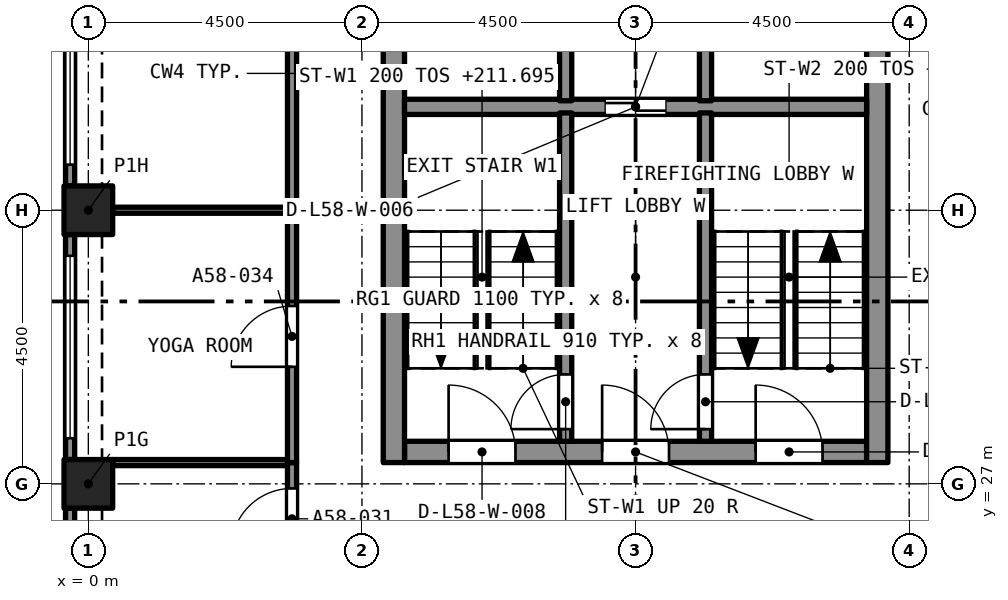
"""IFC4 building model, lengths in metres.
Left out: names, types, materials, properties, quantities, classifications, styles, units other than length and angle.
Written with IfcOpenShell. Run it as: python <this file> out.ifc"""

import sys

from ifc_helpers import new_model, si_unit, direction, frame, frame_2d, origin, origin_2d, place, context, subcontext, project, spatial, rectangle, extrude, element, fill, save


model = new_model("IFC4")
c1 = context("Model", 3, precision=1e-05, world=origin(), true_north=direction((0.0, 1.0)))
c2 = subcontext(c1, "Body", "Model", "MODEL_VIEW")
j1 = project(units=[si_unit("LENGTHUNIT", "METRE"), si_unit("PLANEANGLEUNIT", "RADIAN")], contexts=[c1])
p1 = place(None, origin())
s1 = spatial("IfcSite", under=j1, at=p1, CompositionType="ELEMENT")
p2 = place(p1, origin())
s2 = spatial("IfcBuilding", under=s1, at=p2, CompositionType="ELEMENT")
p3 = place(p2, frame((0.0, 0.0, 210.095)))
s3 = spatial("IfcBuildingStorey", under=s2, at=p3, CompositionType="ELEMENT", Elevation=210.095)
for number, where, z_axis, x_axis in (
    (1, (0.0, 27.0, 0.0), (0.0, 0.0, 1.0), (1.0, 0.0, 0.0)),
    (2, (0.0, 31.5, 0.0), (0.0, 0.0, 1.0), (1.0, 0.0, 0.0)),
):
    element("IfcColumn", number, at=place(p3, frame(where, z_axis=z_axis, x_axis=x_axis)), inside=s3, PredefinedType="COLUMN", context=c2, shape_type="SweptSolid", body=[
        extrude(rectangle(XDim=0.8, YDim=0.8, at=origin_2d()), origin(), (0.0, 0.0, 1.0), 3.2),
    ])
p4 = place(p3, frame((5.2, 27.525, 0.0), z_axis=(0.0, 0.0, 1.0), x_axis=(1.0, 0.0, 0.0)))
e3 = element("IfcWall", 3, at=p4, inside=s3, PredefinedType="SOLIDWALL", context=c2, shape_type="SweptSolid", body=[
    extrude(rectangle(XDim=7.6, YDim=0.35, at=frame_2d((3.8, 0.0))), origin(), (0.0, 0.0, 1.0), 3.2),
])
p5 = place(p4, frame((0.725, 0.0, 0.0)))
e4 = element("IfcOpeningElement", 4, at=p5, cuts=e3, PredefinedType="OPENING", context=c2, shape_type="SweptSolid", body=[
    extrude(rectangle(XDim=1.1, YDim=2.1, at=frame_2d((0.55, 1.05))), frame((0.0, 0.185, 0.0), z_axis=(0.0, -1.0, 0.0), x_axis=(1.0, 0.0, 0.0)), (0.0, 0.0, 1.0), 0.37),
])
p6 = place(p4, frame((3.25, 0.0, 0.0)))
e5 = element("IfcOpeningElement", 5, at=p6, cuts=e3, PredefinedType="OPENING", context=c2, shape_type="SweptSolid", body=[
    extrude(rectangle(XDim=1.1, YDim=2.1, at=frame_2d((0.55, 1.05))), frame((0.0, 0.185, 0.0), z_axis=(0.0, -1.0, 0.0), x_axis=(1.0, 0.0, 0.0)), (0.0, 0.0, 1.0), 0.37),
])
p7 = place(p4, frame((5.775, 0.0, 0.0)))
e6 = element("IfcOpeningElement", 6, at=p7, cuts=e3, PredefinedType="OPENING", context=c2, shape_type="SweptSolid", body=[
    extrude(rectangle(XDim=1.1, YDim=2.1, at=frame_2d((0.55, 1.05))), frame((0.0, 0.185, 0.0), z_axis=(0.0, -1.0, 0.0), x_axis=(1.0, 0.0, 0.0)), (0.0, 0.0, 1.0), 0.37),
])
p8 = place(p3, frame((5.025, 27.35, 0.0), z_axis=(0.0, 0.0, 1.0), x_axis=(0.0, 1.0, 0.0)))
e7 = element("IfcWall", 7, at=p8, inside=s3, PredefinedType="SOLIDWALL", context=c2, shape_type="SweptSolid", body=[
    extrude(rectangle(XDim=12.8, YDim=0.35, at=frame_2d((6.4, 0.0))), origin(), (0.0, 0.0, 1.0), 3.2),
])
p9 = place(p8, frame((8.6, 0.0, 0.0)))
e8 = element("IfcOpeningElement", 8, at=p9, cuts=e7, PredefinedType="OPENING", context=c2, shape_type="SweptSolid", body=[
    extrude(rectangle(XDim=1.2, YDim=2.1, at=frame_2d((0.6, 1.05))), frame((0.0, 0.185, 0.0), z_axis=(0.0, -1.0, 0.0), x_axis=(1.0, 0.0, 0.0)), (0.0, 0.0, 1.0), 0.37),
])
p10 = place(p3, frame((12.975, 27.35, 0.0), z_axis=(0.0, 0.0, 1.0), x_axis=(0.0, 1.0, 0.0)))
e9 = element("IfcWall", 9, at=p10, inside=s3, PredefinedType="SOLIDWALL", context=c2, shape_type="SweptSolid", body=[
    extrude(rectangle(XDim=12.8, YDim=0.35, at=frame_2d((6.4, 0.0))), origin(), (0.0, 0.0, 1.0), 3.2),
])
p11 = place(p10, frame((10.75, 0.0, 0.0)))
e10 = element("IfcOpeningElement", 10, at=p11, cuts=e9, PredefinedType="OPENING", context=c2, shape_type="SweptSolid", body=[
    extrude(rectangle(XDim=1.1, YDim=2.1, at=frame_2d((0.55, 1.05))), frame((0.0, 0.185, 0.0), z_axis=(0.0, -1.0, 0.0), x_axis=(1.0, 0.0, 0.0)), (0.0, 0.0, 1.0), 0.37),
])
p12 = place(p10, frame((8.6, 0.0, 0.0)))
e11 = element("IfcOpeningElement", 11, at=p12, cuts=e9, PredefinedType="OPENING", context=c2, shape_type="SweptSolid", body=[
    extrude(rectangle(XDim=1.2, YDim=2.1, at=frame_2d((0.6, 1.05))), frame((0.0, 0.185, 0.0), z_axis=(0.0, -1.0, 0.0), x_axis=(1.0, 0.0, 0.0)), (0.0, 0.0, 1.0), 0.37),
])
p13 = place(p3, frame((-0.3, 31.9, 0.0), z_axis=(0.0, 0.0, 1.0), x_axis=(0.0, 1.0, 0.0)))
e12 = element("IfcWall", 12, at=p13, inside=s3, PredefinedType="SOLIDWALL", context=c2, shape_type="SweptSolid", body=[
    extrude(rectangle(XDim=3.7, YDim=0.15, at=frame_2d((1.85, 0.0))), origin(), (0.0, 0.0, 1.0), 3.2),
])
p14 = place(p13, frame((0.35, 0.0, 0.45)))
e13 = element("IfcOpeningElement", 13, at=p14, cuts=e12, PredefinedType="OPENING", context=c2, shape_type="SweptSolid", body=[
    extrude(rectangle(XDim=3.0, YDim=1.95, at=frame_2d((1.5, 0.975))), frame((0.0, 0.085, 0.0), z_axis=(0.0, -1.0, 0.0), x_axis=(1.0, 0.0, 0.0)), (0.0, 0.0, 1.0), 0.17),
])
p15 = place(p3, frame((-0.3, 27.4, 0.0), z_axis=(0.0, 0.0, 1.0), x_axis=(0.0, 1.0, 0.0)))
e14 = element("IfcWall", 14, at=p15, inside=s3, PredefinedType="SOLIDWALL", context=c2, shape_type="SweptSolid", body=[
    extrude(rectangle(XDim=3.7, YDim=0.15, at=frame_2d((1.85, 0.0))), origin(), (0.0, 0.0, 1.0), 3.2),
])
p16 = place(p15, frame((0.35, 0.0, 0.45)))
e15 = element("IfcOpeningElement", 15, at=p16, cuts=e14, PredefinedType="OPENING", context=c2, shape_type="SweptSolid", body=[
    extrude(rectangle(XDim=3.0, YDim=1.95, at=frame_2d((1.5, 0.975))), frame((0.0, 0.085, 0.0), z_axis=(0.0, -1.0, 0.0), x_axis=(1.0, 0.0, 0.0)), (0.0, 0.0, 1.0), 0.17),
])
p17 = place(p3, frame((-0.3, 22.9, 0.0), z_axis=(0.0, 0.0, 1.0), x_axis=(0.0, 1.0, 0.0)))
e16 = element("IfcWall", 16, at=p17, inside=s3, PredefinedType="SOLIDWALL", context=c2, shape_type="SweptSolid", body=[
    extrude(rectangle(XDim=3.7, YDim=0.15, at=frame_2d((1.85, 0.0))), origin(), (0.0, 0.0, 1.0), 3.2),
])
p18 = place(p17, frame((0.35, 0.0, 0.45)))
e17 = element("IfcOpeningElement", 17, at=p18, cuts=e16, PredefinedType="OPENING", context=c2, shape_type="SweptSolid", body=[
    extrude(rectangle(XDim=3.0, YDim=1.95, at=frame_2d((1.5, 0.975))), frame((0.0, 0.085, 0.0), z_axis=(0.0, -1.0, 0.0), x_axis=(1.0, 0.0, 0.0)), (0.0, 0.0, 1.0), 0.17),
])
p19 = place(p3, frame((3.35, 25.425, 0.0), z_axis=(0.0, 0.0, 1.0), x_axis=(0.0, 1.0, 0.0)))
e18 = element("IfcWall", 18, at=p19, inside=s3, PredefinedType="PARTITIONING", context=c2, shape_type="SweptSolid", body=[
    extrude(rectangle(XDim=1.925, YDim=0.15, at=frame_2d((0.962, 0.0))), origin(), (0.0, 0.0, 1.0), 2.9),
])
p20 = place(p19, frame((0.5, 0.0, 0.0)))
e19 = element("IfcOpeningElement", 19, at=p20, cuts=e18, PredefinedType="OPENING", context=c2, shape_type="SweptSolid", body=[
    extrude(rectangle(XDim=1.0, YDim=2.1, at=frame_2d((0.5, 1.05))), frame((0.0, 0.085, 0.0), z_axis=(0.0, -1.0, 0.0), x_axis=(1.0, 0.0, 0.0)), (0.0, 0.0, 1.0), 0.17),
])
p21 = place(p3, frame((3.35, 27.35, 0.0), z_axis=(0.0, 0.0, 1.0), x_axis=(0.0, 1.0, 0.0)))
e20 = element("IfcWall", 20, at=p21, inside=s3, PredefinedType="PARTITIONING", context=c2, shape_type="SweptSolid", body=[
    extrude(rectangle(XDim=4.15, YDim=0.15, at=frame_2d((2.075, 0.0))), origin(), (0.0, 0.0, 1.0), 2.9),
])
p22 = place(p21, frame((1.575, 0.0, 0.0)))
e21 = element("IfcOpeningElement", 21, at=p22, cuts=e20, PredefinedType="OPENING", context=c2, shape_type="SweptSolid", body=[
    extrude(rectangle(XDim=1.0, YDim=2.1, at=frame_2d((0.5, 1.05))), frame((0.0, 0.085, 0.0), z_axis=(0.0, -1.0, 0.0), x_axis=(1.0, 0.0, 0.0)), (0.0, 0.0, 1.0), 0.17),
])
p23 = place(p3, frame((3.35, 31.5, 0.0), z_axis=(0.0, 0.0, 1.0), x_axis=(0.0, 1.0, 0.0)))
e22 = element("IfcWall", 22, at=p23, inside=s3, PredefinedType="PARTITIONING", context=c2, shape_type="SweptSolid", body=[
    extrude(rectangle(XDim=8.525, YDim=0.15, at=frame_2d((4.262, 0.0))), origin(), (0.0, 0.0, 1.0), 2.9),
])
p24 = place(p23, frame((3.825, 0.0, 0.0)))
e23 = element("IfcOpeningElement", 23, at=p24, cuts=e22, PredefinedType="OPENING", context=c2, shape_type="SweptSolid", body=[
    extrude(rectangle(XDim=1.0, YDim=2.1, at=frame_2d((0.5, 1.05))), frame((0.0, 0.085, 0.0), z_axis=(0.0, -1.0, 0.0), x_axis=(1.0, 0.0, 0.0)), (0.0, 0.0, 1.0), 0.17),
])
for number, where, z_axis, x_axis in (
    (24, (0.4, 27.35, 0.0), (0.0, 0.0, 1.0), (1.0, 0.0, 0.0)),
    (25, (0.4, 31.5, 0.0), (0.0, 0.0, 1.0), (1.0, 0.0, 0.0)),
):
    element("IfcWall", number, at=place(p3, frame(where, z_axis=z_axis, x_axis=x_axis)), inside=s3, PredefinedType="PARTITIONING", context=c2, shape_type="SweptSolid", body=[
        extrude(rectangle(XDim=2.875, YDim=0.1, at=frame_2d((1.438, 0.0))), origin(), (0.0, 0.0, 1.0), 2.9),
    ])
p25 = place(p3, frame((5.2, 33.2, 0.0), z_axis=(0.0, 0.0, 1.0), x_axis=(1.0, 0.0, 0.0)))
e26 = element("IfcWall", 26, at=p25, inside=s3, PredefinedType="SOLIDWALL", context=c2, shape_type="SweptSolid", body=[
    extrude(rectangle(XDim=7.6, YDim=0.25, at=frame_2d((3.8, 0.0))), origin(), (0.0, 0.0, 1.0), 2.9),
])
p26 = place(p25, frame((3.3, 0.0, 0.0)))
e27 = element("IfcOpeningElement", 27, at=p26, cuts=e26, PredefinedType="OPENING", context=c2, shape_type="SweptSolid", body=[
    extrude(rectangle(XDim=1.0, YDim=2.1, at=frame_2d((0.5, 1.05))), frame((0.0, 0.135, 0.0), z_axis=(0.0, -1.0, 0.0), x_axis=(1.0, 0.0, 0.0)), (0.0, 0.0, 1.0), 0.27),
])
p27 = place(p3, frame((7.85, 27.7, 0.0), z_axis=(0.0, 0.0, 1.0), x_axis=(0.0, 1.0, 0.0)))
e28 = element("IfcWall", 28, at=p27, inside=s3, PredefinedType="SOLIDWALL", context=c2, shape_type="SweptSolid", body=[
    extrude(rectangle(XDim=5.4, YDim=0.2, at=frame_2d((2.7, 0.0))), origin(), (0.0, 0.0, 1.0), 2.9),
])
p28 = place(p27, frame((0.2, 0.0, 0.0)))
e29 = element("IfcOpeningElement", 29, at=p28, cuts=e28, PredefinedType="OPENING", context=c2, shape_type="SweptSolid", body=[
    extrude(rectangle(XDim=0.9, YDim=2.1, at=frame_2d((0.45, 1.05))), frame((0.0, 0.11, 0.0), z_axis=(0.0, -1.0, 0.0), x_axis=(1.0, 0.0, 0.0)), (0.0, 0.0, 1.0), 0.22),
])
p29 = place(p3, frame((10.15, 27.7, 0.0), z_axis=(0.0, 0.0, 1.0), x_axis=(0.0, 1.0, 0.0)))
e30 = element("IfcWall", 30, at=p29, inside=s3, PredefinedType="SOLIDWALL", context=c2, shape_type="SweptSolid", body=[
    extrude(rectangle(XDim=5.4, YDim=0.2, at=frame_2d((2.7, 0.0))), origin(), (0.0, 0.0, 1.0), 2.9),
])
p30 = place(p29, frame((0.2, 0.0, 0.0)))
e31 = element("IfcOpeningElement", 31, at=p30, cuts=e30, PredefinedType="OPENING", context=c2, shape_type="SweptSolid", body=[
    extrude(rectangle(XDim=0.9, YDim=2.1, at=frame_2d((0.45, 1.05))), frame((0.0, 0.11, 0.0), z_axis=(0.0, -1.0, 0.0), x_axis=(1.0, 0.0, 0.0)), (0.0, 0.0, 1.0), 0.22),
])
for number, where, z_axis, x_axis in (
    (32, (7.85, 33.3, 0.0), (0.0, 0.0, 1.0), (0.0, 1.0, 0.0)),
    (33, (10.15, 33.3, 0.0), (0.0, 0.0, 1.0), (0.0, 1.0, 0.0)),
):
    element("IfcWall", number, at=place(p3, frame(where, z_axis=z_axis, x_axis=x_axis)), inside=s3, PredefinedType="SOLIDWALL", context=c2, shape_type="SweptSolid", body=[
        extrude(rectangle(XDim=2.3, YDim=0.2, at=frame_2d((1.15, 0.0))), origin(), (0.0, 0.0, 1.0), 2.9),
    ])
p31 = place(p14, origin())
e34 = element("IfcWindow", 34, at=p31, inside=s3, PartitioningType="SINGLE_PANEL", PredefinedType="WINDOW", context=c2, shape_type="SweptSolid", body=[
    extrude(rectangle(XDim=3.0, YDim=1.95, at=frame_2d((1.5, 0.975))), frame((0.0, 0.03, 0.0), z_axis=(0.0, -1.0, 0.0), x_axis=(1.0, 0.0, 0.0)), (0.0, 0.0, 1.0), 0.06),
])
fill(e13, e34)
p32 = place(p16, origin())
e35 = element("IfcWindow", 35, at=p32, inside=s3, PartitioningType="SINGLE_PANEL", PredefinedType="WINDOW", context=c2, shape_type="SweptSolid", body=[
    extrude(rectangle(XDim=3.0, YDim=1.95, at=frame_2d((1.5, 0.975))), frame((0.0, 0.03, 0.0), z_axis=(0.0, -1.0, 0.0), x_axis=(1.0, 0.0, 0.0)), (0.0, 0.0, 1.0), 0.06),
])
fill(e15, e35)
p33 = place(p20, origin())
e36 = element("IfcDoor", 36, at=p33, inside=s3, OperationType="SINGLE_SWING_RIGHT", PredefinedType="DOOR", context=c2, shape_type="SweptSolid", body=[
    extrude(rectangle(XDim=1.0, YDim=2.1, at=frame_2d((0.5, 1.05))), frame((0.0, 0.025, 0.0), z_axis=(0.0, -1.0, 0.0), x_axis=(1.0, 0.0, 0.0)), (0.0, 0.0, 1.0), 0.05),
])
fill(e19, e36)
p34 = place(p22, origin())
e37 = element("IfcDoor", 37, at=p34, inside=s3, OperationType="SINGLE_SWING_RIGHT", PredefinedType="DOOR", context=c2, shape_type="SweptSolid", body=[
    extrude(rectangle(XDim=1.0, YDim=2.1, at=frame_2d((0.5, 1.05))), frame((0.0, 0.025, 0.0), z_axis=(0.0, -1.0, 0.0), x_axis=(1.0, 0.0, 0.0)), (0.0, 0.0, 1.0), 0.05),
])
fill(e21, e37)
p35 = place(p28, origin())
e38 = element("IfcDoor", 38, at=p35, inside=s3, OperationType="SINGLE_SWING_LEFT", PredefinedType="DOOR", context=c2, shape_type="SweptSolid", body=[
    extrude(rectangle(XDim=0.9, YDim=2.1, at=frame_2d((0.45, 1.05))), frame((0.0, 0.025, 0.0), z_axis=(0.0, -1.0, 0.0), x_axis=(1.0, 0.0, 0.0)), (0.0, 0.0, 1.0), 0.05),
])
fill(e29, e38)
p36 = place(p30, origin())
e39 = element("IfcDoor", 39, at=p36, inside=s3, OperationType="SINGLE_SWING_LEFT", PredefinedType="DOOR", context=c2, shape_type="SweptSolid", body=[
    extrude(rectangle(XDim=0.9, YDim=2.1, at=frame_2d((0.45, 1.05))), frame((0.0, 0.025, 0.0), z_axis=(0.0, -1.0, 0.0), x_axis=(1.0, 0.0, 0.0)), (0.0, 0.0, 1.0), 0.05),
])
fill(e31, e39)
p37 = place(p26, origin())
e40 = element("IfcDoor", 40, at=p37, inside=s3, OperationType="SLIDING_TO_LEFT", PredefinedType="DOOR", context=c2, shape_type="SweptSolid", body=[
    extrude(rectangle(XDim=1.0, YDim=2.1, at=frame_2d((0.5, 1.05))), frame((0.0, 0.025, 0.0), z_axis=(0.0, -1.0, 0.0), x_axis=(1.0, 0.0, 0.0)), (0.0, 0.0, 1.0), 0.05),
])
fill(e27, e40)
p38 = place(p5, origin())
e41 = element("IfcDoor", 41, at=p38, inside=s3, OperationType="SINGLE_SWING_LEFT", PredefinedType="DOOR", context=c2, shape_type="SweptSolid", body=[
    extrude(rectangle(XDim=1.1, YDim=2.1, at=frame_2d((0.55, 1.05))), frame((0.0, 0.025, 0.0), z_axis=(0.0, -1.0, 0.0), x_axis=(1.0, 0.0, 0.0)), (0.0, 0.0, 1.0), 0.05),
])
fill(e4, e41)
p39 = place(p6, origin())
e42 = element("IfcDoor", 42, at=p39, inside=s3, OperationType="SINGLE_SWING_LEFT", PredefinedType="DOOR", context=c2, shape_type="SweptSolid", body=[
    extrude(rectangle(XDim=1.1, YDim=2.1, at=frame_2d((0.55, 1.05))), frame((0.0, 0.025, 0.0), z_axis=(0.0, -1.0, 0.0), x_axis=(1.0, 0.0, 0.0)), (0.0, 0.0, 1.0), 0.05),
])
fill(e5, e42)
p40 = place(p7, origin())
e43 = element("IfcDoor", 43, at=p40, inside=s3, OperationType="SINGLE_SWING_LEFT", PredefinedType="DOOR", context=c2, shape_type="SweptSolid", body=[
    extrude(rectangle(XDim=1.1, YDim=2.1, at=frame_2d((0.55, 1.05))), frame((0.0, 0.025, 0.0), z_axis=(0.0, -1.0, 0.0), x_axis=(1.0, 0.0, 0.0)), (0.0, 0.0, 1.0), 0.05),
])
fill(e6, e43)
save(model, sys.argv[1])
